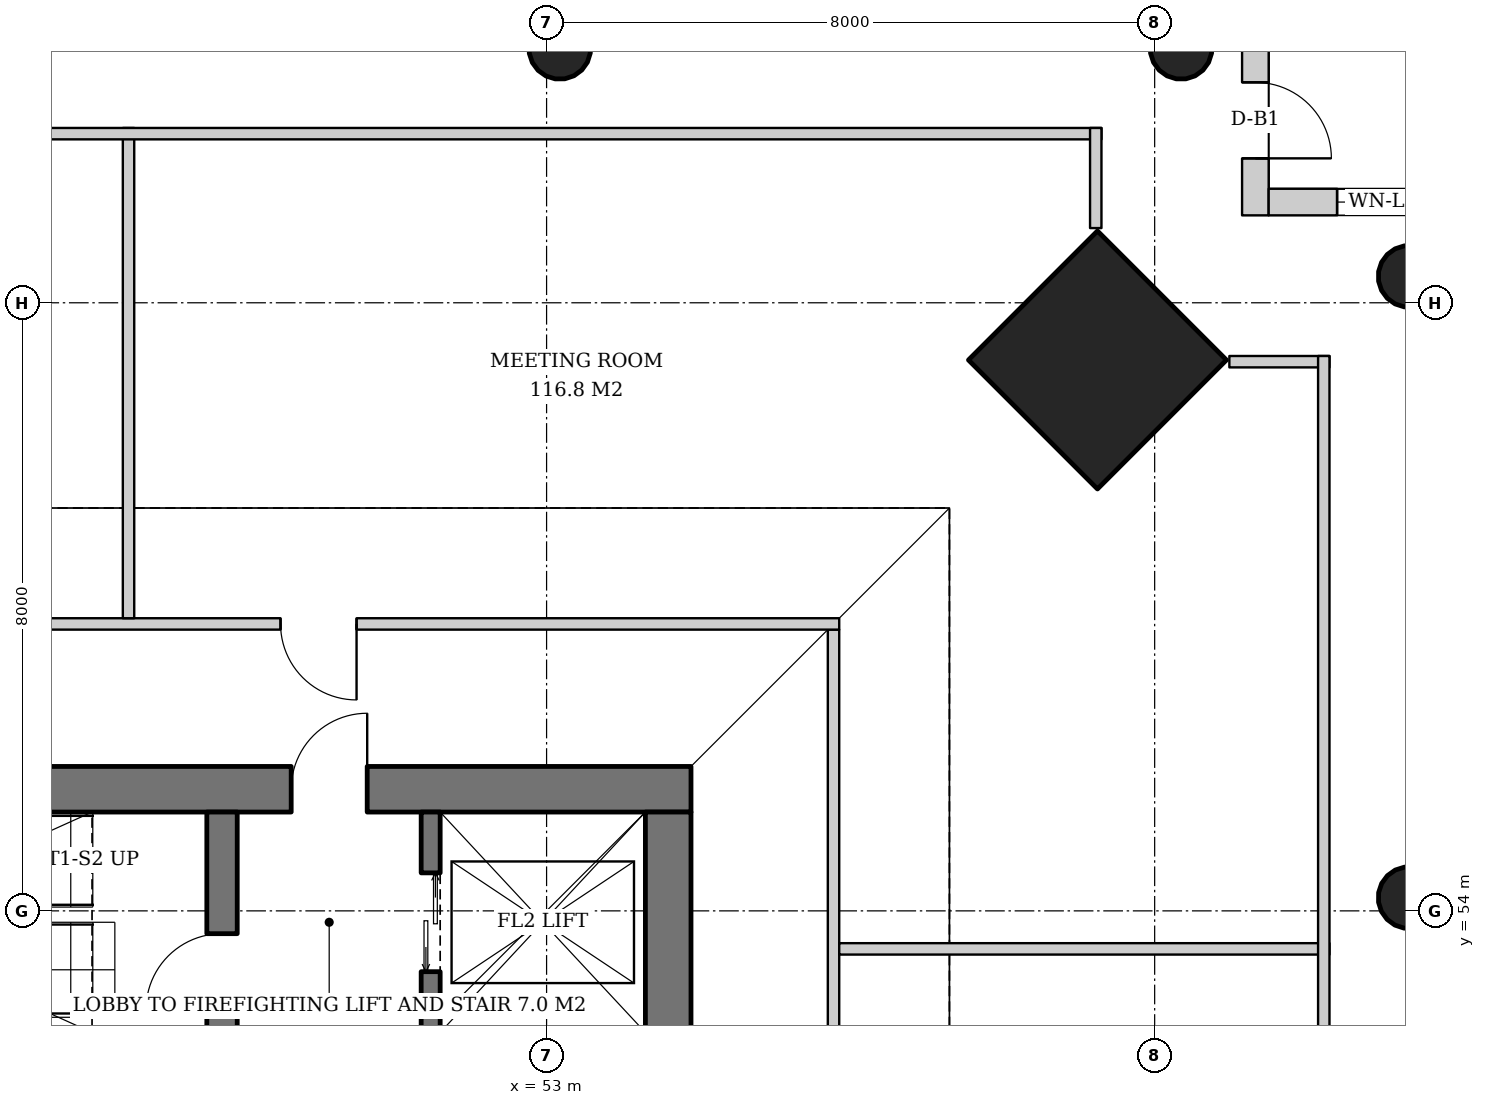
"""IFC4 building model, lengths in metres.
Left out: names, types, materials, properties, quantities, classifications, styles, units other than length and angle.
Written with IfcOpenShell. Run it as: python <this file> out.ifc"""

import sys

from ifc_helpers import new_model, si_unit, direction, frame, frame_2d, origin, origin_2d, place, context, subcontext, project, spatial, rectangle, hollow_circle, extrude, element, fill, save


model = new_model("IFC4")
c1 = context("Model", 3, precision=1e-05, world=origin(), true_north=direction((0.0, 1.0)))
c2 = subcontext(c1, "Body", "Model", "MODEL_VIEW")
j1 = project(units=[si_unit("LENGTHUNIT", "METRE"), si_unit("PLANEANGLEUNIT", "RADIAN")], contexts=[c1])
p1 = place(None, origin())
s1 = spatial("IfcSite", under=j1, at=p1, CompositionType="ELEMENT")
p2 = place(p1, origin())
s2 = spatial("IfcBuilding", under=s1, at=p2, CompositionType="ELEMENT")
p3 = place(p2, frame((0.0, 0.0, 165.4)))
s3 = spatial("IfcBuildingStorey", under=s2, at=p3, CompositionType="ELEMENT", Elevation=165.4)
p4 = place(p3, frame((60.286, 61.286, 0.0), z_axis=(-0.031898107953, -0.031898107953, 0.998981992539), x_axis=(0.707106781187, -0.707106781187, 0.0)))
e1 = element("IfcColumn", 1, at=p4, inside=s3, PredefinedType="COLUMN", context=c2, shape_type="SweptSolid", body=[
    extrude(rectangle(XDim=2.4, YDim=2.4, at=origin_2d()), origin(), (0.0, 0.0, 1.0), 3.804),
])
p5 = place(p3, frame((64.386, 62.386, 0.0), z_axis=(-0.031898107953, -0.031898107953, 0.998981992539), x_axis=(0.707106781187, -0.707106781187, 0.0)))
e2 = element("IfcColumn", 2, at=p5, inside=s3, PredefinedType="COLUMN", context=c2, shape_type="SweptSolid", body=[
    extrude(hollow_circle(Radius=0.406, WallThickness=0.03, at=origin_2d()), origin(), (0.0, 0.0, 1.0), 3.804),
])
p6 = place(p3, frame((64.386, 54.193, 0.0), z_axis=(-0.031910269556, -0.015987237665, 0.999362868496), x_axis=(0.447933021895, -0.894067115991, 0.0)))
e3 = element("IfcColumn", 3, at=p6, inside=s3, PredefinedType="COLUMN", context=c2, shape_type="SweptSolid", body=[
    extrude(hollow_circle(Radius=0.406, WallThickness=0.03, at=origin_2d()), origin(), (0.0, 0.0, 1.0), 3.802),
])
p7 = place(p3, frame((61.386, 65.386, 0.0), z_axis=(-0.031898107953, -0.031898107953, 0.998981992539), x_axis=(0.707106781187, -0.707106781187, 0.0)))
e4 = element("IfcColumn", 4, at=p7, inside=s3, PredefinedType="COLUMN", context=c2, shape_type="SweptSolid", body=[
    extrude(hollow_circle(Radius=0.406, WallThickness=0.03, at=origin_2d()), origin(), (0.0, 0.0, 1.0), 3.804),
])
p8 = place(p3, frame((53.193, 65.386, 0.0), z_axis=(-0.015987237665, -0.031910269556, 0.999362868496), x_axis=(0.894067115991, -0.447933021895, 0.0)))
e5 = element("IfcColumn", 5, at=p8, inside=s3, PredefinedType="COLUMN", context=c2, shape_type="SweptSolid", body=[
    extrude(hollow_circle(Radius=0.406, WallThickness=0.03, at=origin_2d()), origin(), (0.0, 0.0, 1.0), 3.802),
])
p9 = place(p3, frame((35.1, 55.6, 0.0), z_axis=(0.0, 0.0, 1.0), x_axis=(1.0, 0.0, 0.0)))
e6 = element("IfcWall", 6, at=p9, inside=s3, PredefinedType="SHEAR", context=c2, shape_type="SweptSolid", body=[
    extrude(rectangle(XDim=19.8, YDim=0.6, at=frame_2d((9.9, 0.0))), origin(), (0.0, 0.0, 1.0), 3.8),
])
p10 = place(p9, frame((14.54, 0.0, 0.0)))
e7 = element("IfcOpeningElement", 7, at=p10, cuts=e6, PredefinedType="OPENING", context=c2, shape_type="SweptSolid", body=[
    extrude(rectangle(XDim=1.0, YDim=2.1, at=frame_2d((0.5, 1.05))), frame((0.0, 0.31, 0.0), z_axis=(0.0, -1.0, 0.0), x_axis=(1.0, 0.0, 0.0)), (0.0, 0.0, 1.0), 0.62),
])
p11 = place(p9, frame((2.425, 0.0, 0.0)))
e8 = element("IfcOpeningElement", 8, at=p11, cuts=e6, PredefinedType="OPENING", context=c2, shape_type="SweptSolid", body=[
    extrude(rectangle(XDim=1.0, YDim=2.1, at=frame_2d((0.5, 1.05))), frame((0.0, 0.31, 0.0), z_axis=(0.0, -1.0, 0.0), x_axis=(1.0, 0.0, 0.0)), (0.0, 0.0, 1.0), 0.62),
])
p12 = place(p3, frame((54.6, 36.7, 0.0), z_axis=(0.0, 0.0, 1.0), x_axis=(0.0, 1.0, 0.0)))
e9 = element("IfcWall", 9, at=p12, inside=s3, PredefinedType="SHEAR", context=c2, shape_type="SweptSolid", body=[
    extrude(rectangle(XDim=18.6, YDim=0.6, at=frame_2d((9.3, 0.0))), origin(), (0.0, 0.0, 1.0), 3.8),
])
p13 = place(p12, frame((8.4, 0.0, 0.0)))
e10 = element("IfcOpeningElement", 10, at=p13, cuts=e9, PredefinedType="OPENING", context=c2, shape_type="SweptSolid", body=[
    extrude(rectangle(XDim=1.8, YDim=2.4, at=frame_2d((0.9, 1.2))), frame((0.0, 0.31, 0.0), z_axis=(0.0, -1.0, 0.0), x_axis=(1.0, 0.0, 0.0)), (0.0, 0.0, 1.0), 0.62),
])
p14 = place(p3, frame((48.73, 52.4, 0.0), z_axis=(0.0, 0.0, 1.0), x_axis=(0.0, 1.0, 0.0)))
e11 = element("IfcWall", 11, at=p14, inside=s3, PredefinedType="SHEAR", context=c2, shape_type="SweptSolid", body=[
    extrude(rectangle(XDim=2.9, YDim=0.4, at=frame_2d((1.45, 0.0))), origin(), (0.0, 0.0, 1.0), 3.8),
])
p15 = place(p14, frame((0.3, 0.0, 0.0)))
e12 = element("IfcOpeningElement", 12, at=p15, cuts=e11, PredefinedType="OPENING", context=c2, shape_type="SweptSolid", body=[
    extrude(rectangle(XDim=1.0, YDim=2.1, at=frame_2d((0.5, 1.05))), frame((0.0, 0.21, 0.0), z_axis=(0.0, -1.0, 0.0), x_axis=(1.0, 0.0, 0.0)), (0.0, 0.0, 1.0), 0.42),
])
p16 = place(p3, frame((62.325, 66.5, 0.0), z_axis=(0.0, 0.0, 1.0), x_axis=(0.0, -1.0, 0.0)))
e13 = element("IfcWall", 13, at=p16, inside=s3, PredefinedType="SOLIDWALL", context=c2, shape_type="SweptSolid", body=[
    extrude(rectangle(XDim=3.35, YDim=0.35, at=frame_2d((1.675, 0.0))), origin(), (0.0, 0.0, 1.0), 3.62),
])
p17 = place(p16, frame((1.6, 0.0, 0.0)))
e14 = element("IfcOpeningElement", 14, at=p17, cuts=e13, PredefinedType="OPENING", context=c2, shape_type="SweptSolid", body=[
    extrude(rectangle(XDim=1.0, YDim=2.4, at=frame_2d((0.5, 1.2))), frame((0.0, 0.185, 0.0), z_axis=(0.0, -1.0, 0.0), x_axis=(1.0, 0.0, 0.0)), (0.0, 0.0, 1.0), 0.37),
])
p18 = place(p3, frame((62.5, 63.325, 0.0), z_axis=(0.0, 0.0, 1.0), x_axis=(1.0, 0.0, 0.0)))
e15 = element("IfcWall", 15, at=p18, inside=s3, PredefinedType="SOLIDWALL", context=c2, shape_type="SweptSolid", body=[
    extrude(rectangle(XDim=3.0, YDim=0.35, at=frame_2d((1.5, 0.0))), origin(), (0.0, 0.0, 1.0), 3.62),
])
p19 = place(p18, frame((0.9, 0.0, 0.6)))
e16 = element("IfcOpeningElement", 16, at=p19, cuts=e15, PredefinedType="OPENING", context=c2, shape_type="SweptSolid", body=[
    extrude(rectangle(XDim=1.2, YDim=2.55, at=frame_2d((0.6, 1.275))), frame((0.0, 0.185, 0.0), z_axis=(0.0, -1.0, 0.0), x_axis=(1.0, 0.0, 0.0)), (0.0, 0.0, 1.0), 0.37),
])
p20 = place(p3, frame((51.475, 52.4, 0.0), z_axis=(0.0, 0.0, 1.0), x_axis=(0.0, 1.0, 0.0)))
e17 = element("IfcWall", 17, at=p20, inside=s3, PredefinedType="SHEAR", context=c2, shape_type="SweptSolid", body=[
    extrude(rectangle(XDim=2.9, YDim=0.25, at=frame_2d((1.45, 0.0))), origin(), (0.0, 0.0, 1.0), 3.8),
])
p21 = place(p20, frame((0.8, 0.0, 0.0)))
e18 = element("IfcOpeningElement", 18, at=p21, cuts=e17, PredefinedType="OPENING", context=c2, shape_type="SweptSolid", body=[
    extrude(rectangle(XDim=1.3, YDim=2.2, at=frame_2d((0.65, 1.1))), frame((0.0, 0.135, 0.0), z_axis=(0.0, -1.0, 0.0), x_axis=(1.0, 0.0, 0.0)), (0.0, 0.0, 1.0), 0.27),
])
p22 = place(p3, frame((56.775, 34.15, 0.0), z_axis=(0.0, 0.0, 1.0), x_axis=(0.0, 1.0, 0.0)))
e19 = element("IfcWall", 19, at=p22, inside=s3, PredefinedType="PARTITIONING", context=c2, shape_type="SweptSolid", body=[
    extrude(rectangle(XDim=23.55, YDim=0.15, at=frame_2d((11.775, 0.0))), origin(), (0.0, 0.0, 1.0), 2.85),
])
p23 = place(p22, frame((6.35, 0.0, 0.0)))
e20 = element("IfcOpeningElement", 20, at=p23, cuts=e19, PredefinedType="OPENING", context=c2, shape_type="SweptSolid", body=[
    extrude(rectangle(XDim=1.0, YDim=2.1, at=frame_2d((0.5, 1.05))), frame((0.0, 0.085, 0.0), z_axis=(0.0, -1.0, 0.0), x_axis=(1.0, 0.0, 0.0)), (0.0, 0.0, 1.0), 0.17),
])
p24 = place(p22, frame((10.95, 0.0, 0.0)))
e21 = element("IfcOpeningElement", 21, at=p24, cuts=e19, PredefinedType="OPENING", context=c2, shape_type="SweptSolid", body=[
    extrude(rectangle(XDim=1.8, YDim=2.4, at=frame_2d((0.9, 1.2))), frame((0.0, 0.085, 0.0), z_axis=(0.0, -1.0, 0.0), x_axis=(1.0, 0.0, 0.0)), (0.0, 0.0, 1.0), 0.17),
])
p25 = place(p22, frame((15.95, 0.0, 0.0)))
e22 = element("IfcOpeningElement", 22, at=p25, cuts=e19, PredefinedType="OPENING", context=c2, shape_type="SweptSolid", body=[
    extrude(rectangle(XDim=1.8, YDim=2.4, at=frame_2d((0.9, 1.2))), frame((0.0, 0.085, 0.0), z_axis=(0.0, -1.0, 0.0), x_axis=(1.0, 0.0, 0.0)), (0.0, 0.0, 1.0), 0.17),
])
p26 = place(p3, frame((56.85, 53.5, 0.0), z_axis=(0.0, 0.0, 1.0), x_axis=(1.0, 0.0, 0.0)))
e23 = element("IfcWall", 23, at=p26, inside=s3, PredefinedType="PARTITIONING", context=c2, shape_type="SweptSolid", body=[
    extrude(rectangle(XDim=6.45, YDim=0.15, at=frame_2d((3.225, 0.0))), origin(), (0.0, 0.0, 1.0), 3.62),
])
p27 = place(p3, frame((56.85, 57.775, 0.0), z_axis=(0.0, 0.0, 1.0), x_axis=(-1.0, 0.0, 0.0)))
e24 = element("IfcWall", 24, at=p27, inside=s3, PredefinedType="PARTITIONING", context=c2, shape_type="SweptSolid", body=[
    extrude(rectangle(XDim=23.55, YDim=0.15, at=frame_2d((11.775, 0.0))), origin(), (0.0, 0.0, 1.0), 2.85),
])
p28 = place(p27, frame((6.35, 0.0, 0.0)))
e25 = element("IfcOpeningElement", 25, at=p28, cuts=e24, PredefinedType="OPENING", context=c2, shape_type="SweptSolid", body=[
    extrude(rectangle(XDim=1.0, YDim=2.1, at=frame_2d((0.5, 1.05))), frame((0.0, 0.085, 0.0), z_axis=(0.0, -1.0, 0.0), x_axis=(1.0, 0.0, 0.0)), (0.0, 0.0, 1.0), 0.17),
])
p29 = place(p27, frame((11.35, 0.0, 0.0)))
e26 = element("IfcOpeningElement", 26, at=p29, cuts=e24, PredefinedType="OPENING", context=c2, shape_type="SweptSolid", body=[
    extrude(rectangle(XDim=1.0, YDim=2.1, at=frame_2d((0.5, 1.05))), frame((0.0, 0.085, 0.0), z_axis=(0.0, -1.0, 0.0), x_axis=(1.0, 0.0, 0.0)), (0.0, 0.0, 1.0), 0.17),
])
p30 = place(p27, frame((16.35, 0.0, 0.0)))
e27 = element("IfcOpeningElement", 27, at=p30, cuts=e24, PredefinedType="OPENING", context=c2, shape_type="SweptSolid", body=[
    extrude(rectangle(XDim=1.0, YDim=2.1, at=frame_2d((0.5, 1.05))), frame((0.0, 0.085, 0.0), z_axis=(0.0, -1.0, 0.0), x_axis=(1.0, 0.0, 0.0)), (0.0, 0.0, 1.0), 0.17),
])
p31 = place(p3, frame((47.5, 57.85, 0.0), z_axis=(0.0, 0.0, 1.0), x_axis=(0.0, 1.0, 0.0)))
e28 = element("IfcWall", 28, at=p31, inside=s3, PredefinedType="PARTITIONING", context=c2, shape_type="SweptSolid", body=[
    extrude(rectangle(XDim=6.45, YDim=0.15, at=frame_2d((3.225, 0.0))), origin(), (0.0, 0.0, 1.0), 3.62),
])
p32 = place(p3, frame((29.7, 64.225, 0.0), z_axis=(0.0, 0.0, 1.0), x_axis=(1.0, 0.0, 0.0)))
e29 = element("IfcWall", 29, at=p32, inside=s3, PredefinedType="PARTITIONING", context=c2, shape_type="SweptSolid", body=[
    extrude(rectangle(XDim=30.6, YDim=0.15, at=frame_2d((15.3, 0.0))), origin(), (0.0, 0.0, 1.0), 2.85),
])
for number, where, z_axis, x_axis in (
    (30, (60.225, 64.3, 0.0), (0.0, 0.0, 1.0), (0.0, -1.0, 0.0)),
    (31, (61.983, 61.225, 0.0), (0.0, 0.0, 1.0), (1.0, 0.0, 0.0)),
):
    element("IfcWall", number, at=place(p3, frame(where, z_axis=z_axis, x_axis=x_axis)), inside=s3, PredefinedType="PARTITIONING", context=c2, shape_type="SweptSolid", body=[
        extrude(rectangle(XDim=1.317, YDim=0.15, at=frame_2d((0.659, 0.0))), origin(), (0.0, 0.0, 1.0), 3.62),
    ])
p33 = place(p3, frame((63.225, 61.3, 0.0), z_axis=(0.0, 0.0, 1.0), x_axis=(0.0, -1.0, 0.0)))
e32 = element("IfcWall", 32, at=p33, inside=s3, PredefinedType="PARTITIONING", context=c2, shape_type="SweptSolid", body=[
    extrude(rectangle(XDim=30.6, YDim=0.15, at=frame_2d((15.3, 0.0))), origin(), (0.0, 0.0, 1.0), 2.85),
])
p34 = place(p17, origin())
e33 = element("IfcDoor", 33, at=p34, inside=s3, OperationType="SINGLE_SWING_RIGHT", PredefinedType="DOOR", context=c2, shape_type="SweptSolid", body=[
    extrude(rectangle(XDim=1.0, YDim=2.4, at=frame_2d((0.5, 1.2))), frame((0.0, 0.025, 0.0), z_axis=(0.0, -1.0, 0.0), x_axis=(1.0, 0.0, 0.0)), (0.0, 0.0, 1.0), 0.05),
])
fill(e14, e33)
p35 = place(p19, origin())
e34 = element("IfcWindow", 34, at=p35, inside=s3, PartitioningType="SINGLE_PANEL", PredefinedType="WINDOW", context=c2, shape_type="SweptSolid", body=[
    extrude(rectangle(XDim=1.2, YDim=2.55, at=frame_2d((0.6, 1.275))), frame((0.0, 0.03, 0.0), z_axis=(0.0, -1.0, 0.0), x_axis=(1.0, 0.0, 0.0)), (0.0, 0.0, 1.0), 0.06),
])
fill(e16, e34)
p36 = place(p21, origin())
e35 = element("IfcDoor", 35, at=p36, inside=s3, OperationType="DOUBLE_DOOR_SLIDING", PredefinedType="DOOR", context=c2, shape_type="SweptSolid", body=[
    extrude(rectangle(XDim=1.3, YDim=2.2, at=frame_2d((0.65, 1.1))), frame((0.0, 0.025, 0.0), z_axis=(0.0, -1.0, 0.0), x_axis=(1.0, 0.0, 0.0)), (0.0, 0.0, 1.0), 0.05),
])
fill(e18, e35)
p37 = place(p15, origin())
e36 = element("IfcDoor", 36, at=p37, inside=s3, OperationType="SINGLE_SWING_LEFT", PredefinedType="DOOR", context=c2, shape_type="SweptSolid", body=[
    extrude(rectangle(XDim=1.0, YDim=2.1, at=frame_2d((0.5, 1.05))), frame((0.0, 0.025, 0.0), z_axis=(0.0, -1.0, 0.0), x_axis=(1.0, 0.0, 0.0)), (0.0, 0.0, 1.0), 0.05),
])
fill(e12, e36)
p38 = place(p10, origin())
e37 = element("IfcDoor", 37, at=p38, inside=s3, OperationType="SINGLE_SWING_RIGHT", PredefinedType="DOOR", context=c2, shape_type="SweptSolid", body=[
    extrude(rectangle(XDim=1.0, YDim=2.1, at=frame_2d((0.5, 1.05))), frame((0.0, 0.025, 0.0), z_axis=(0.0, -1.0, 0.0), x_axis=(1.0, 0.0, 0.0)), (0.0, 0.0, 1.0), 0.05),
])
fill(e7, e37)
p39 = place(p28, origin())
e38 = element("IfcDoor", 38, at=p39, inside=s3, OperationType="SINGLE_SWING_LEFT", PredefinedType="DOOR", context=c2, shape_type="SweptSolid", body=[
    extrude(rectangle(XDim=1.0, YDim=2.1, at=frame_2d((0.5, 1.05))), frame((0.0, 0.025, 0.0), z_axis=(0.0, -1.0, 0.0), x_axis=(1.0, 0.0, 0.0)), (0.0, 0.0, 1.0), 0.05),
])
fill(e25, e38)
save(model, sys.argv[1])
